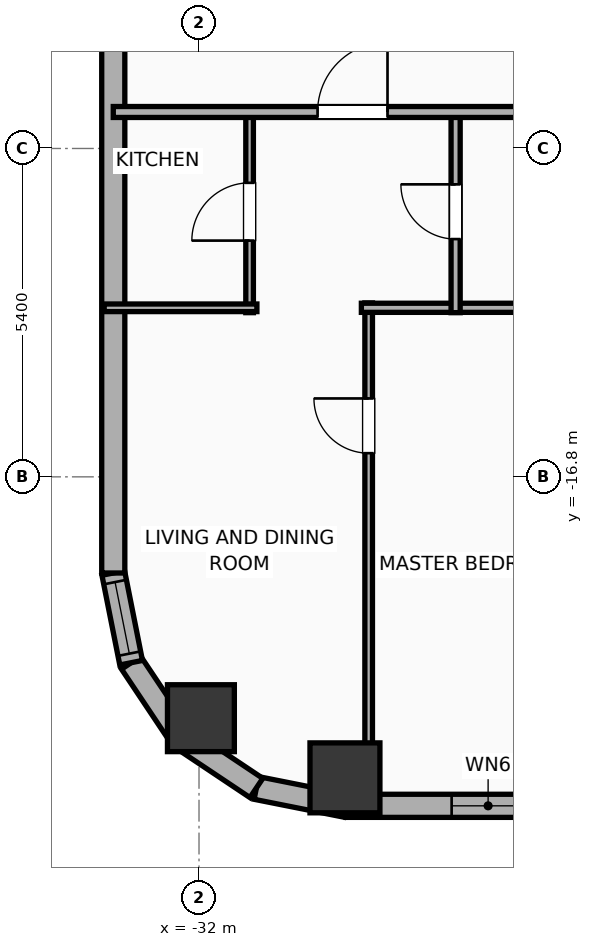
"""IFC4 building model, lengths in metres.
Left out: names, types, materials, properties, quantities, classifications, styles, units other than length and angle.
Written with IfcOpenShell. Run it as: python <this file> out.ifc"""

import sys

from ifc_helpers import new_model, si_unit, direction, frame, frame_2d, origin, origin_2d, place, context, subcontext, project, spatial, rectangle, hollow_rectangle, hollow_circle, extrude, element, fill, save


model = new_model("IFC4")
c1 = context("Model", 3, precision=1e-05, world=origin(), true_north=direction((0.0, 1.0)))
c2 = subcontext(c1, "Body", "Model", "MODEL_VIEW")
j1 = project(units=[si_unit("LENGTHUNIT", "METRE"), si_unit("PLANEANGLEUNIT", "RADIAN")], contexts=[c1])
p1 = place(None, origin())
s1 = spatial("IfcSite", under=j1, at=p1, CompositionType="ELEMENT")
p2 = place(p1, origin())
s2 = spatial("IfcBuilding", under=s1, at=p2, CompositionType="ELEMENT")
p3 = place(p2, frame((0.0, 0.0, 29.9)))
s3 = spatial("IfcBuildingStorey", under=s2, at=p3, CompositionType="ELEMENT", Elevation=29.9)
p4 = place(p3, frame((-29.6, -21.75, 0.0), z_axis=(0.0, 0.0, 1.0), x_axis=(1.0, 0.0, 0.0)))
e1 = element("IfcColumn", 1, at=p4, inside=s3, PredefinedType="COLUMN", context=c2, shape_type="SweptSolid", body=[
    extrude(hollow_rectangle(XDim=1.15, YDim=1.15, WallThickness=0.04, at=origin_2d()), origin(), (0.0, 0.0, 1.0), 3.9),
])
p5 = place(p3, frame((-31.969, -20.769, 0.0), z_axis=(0.0, 0.0, 1.0), x_axis=(1.0, 0.0, 0.0)))
e2 = element("IfcColumn", 2, at=p5, inside=s3, PredefinedType="COLUMN", context=c2, shape_type="SweptSolid", body=[
    extrude(hollow_circle(Radius=0.55, WallThickness=0.036, at=origin_2d()), origin(), (0.0, 0.0, 1.0), 3.9),
])
p6 = place(p3, frame((22.381, -22.21, 0.0), z_axis=(0.0, 0.0, 1.0), x_axis=(-1.0, 0.0, 0.0)))
e3 = element("IfcWall", 3, at=p6, inside=s3, PredefinedType="ELEMENTEDWALL", context=c2, shape_type="SweptSolid", body=[
    extrude(rectangle(XDim=51.963, YDim=0.38, at=frame_2d((25.981, 0.0))), origin(), (0.0, 0.0, 1.0), 2.54),
])
p7 = place(p6, frame((5.81, 0.0, 0.75)))
e4 = element("IfcOpeningElement", 4, at=p7, cuts=e3, PredefinedType="OPENING", context=c2, shape_type="SweptSolid", body=[
    extrude(rectangle(XDim=2.4, YDim=1.63, at=frame_2d((1.2, 0.815))), frame((0.0, 0.2, 0.0), z_axis=(0.0, -1.0, 0.0), x_axis=(1.0, 0.0, 0.0)), (0.0, 0.0, 1.0), 0.4),
])
p8 = place(p6, frame((26.431, 0.0, 0.75)))
e5 = element("IfcOpeningElement", 5, at=p8, cuts=e3, PredefinedType="OPENING", context=c2, shape_type="SweptSolid", body=[
    extrude(rectangle(XDim=2.4, YDim=1.63, at=frame_2d((1.2, 0.815))), frame((0.0, 0.2, 0.0), z_axis=(0.0, -1.0, 0.0), x_axis=(1.0, 0.0, 0.0)), (0.0, 0.0, 1.0), 0.4),
])
p9 = place(p6, frame((42.952, 0.0, 0.75)))
e6 = element("IfcOpeningElement", 6, at=p9, cuts=e3, PredefinedType="OPENING", context=c2, shape_type="SweptSolid", body=[
    extrude(rectangle(XDim=2.4, YDim=1.63, at=frame_2d((1.2, 0.815))), frame((0.0, 0.2, 0.0), z_axis=(0.0, -1.0, 0.0), x_axis=(1.0, 0.0, 0.0)), (0.0, 0.0, 1.0), 0.4),
])
p10 = place(p6, frame((49.027, 0.0, 0.75)))
e7 = element("IfcOpeningElement", 7, at=p10, cuts=e3, PredefinedType="OPENING", context=c2, shape_type="SweptSolid", body=[
    extrude(rectangle(XDim=1.2, YDim=1.63, at=frame_2d((0.6, 0.815))), frame((0.0, 0.2, 0.0), z_axis=(0.0, -1.0, 0.0), x_axis=(1.0, 0.0, 0.0)), (0.0, 0.0, 1.0), 0.4),
])
p11 = place(p6, frame((46.476, 0.0, 0.75)))
e8 = element("IfcOpeningElement", 8, at=p11, cuts=e3, PredefinedType="OPENING", context=c2, shape_type="SweptSolid", body=[
    extrude(rectangle(XDim=1.2, YDim=1.63, at=frame_2d((0.6, 0.815))), frame((0.0, 0.2, 0.0), z_axis=(0.0, -1.0, 0.0), x_axis=(1.0, 0.0, 0.0)), (0.0, 0.0, 1.0), 0.4),
])
p12 = place(p6, frame((39.181, 0.0, 0.75)))
e9 = element("IfcOpeningElement", 9, at=p12, cuts=e3, PredefinedType="OPENING", context=c2, shape_type="SweptSolid", body=[
    extrude(rectangle(XDim=1.2, YDim=1.63, at=frame_2d((0.6, 0.815))), frame((0.0, 0.2, 0.0), z_axis=(0.0, -1.0, 0.0), x_axis=(1.0, 0.0, 0.0)), (0.0, 0.0, 1.0), 0.4),
])
p13 = place(p6, frame((32.476, 0.0, 0.75)))
e10 = element("IfcOpeningElement", 10, at=p13, cuts=e3, PredefinedType="OPENING", context=c2, shape_type="SweptSolid", body=[
    extrude(rectangle(XDim=1.2, YDim=1.63, at=frame_2d((0.6, 0.815))), frame((0.0, 0.2, 0.0), z_axis=(0.0, -1.0, 0.0), x_axis=(1.0, 0.0, 0.0)), (0.0, 0.0, 1.0), 0.4),
])
p14 = place(p6, frame((35.276, 0.0, 0.75)))
e11 = element("IfcOpeningElement", 11, at=p14, cuts=e3, PredefinedType="OPENING", context=c2, shape_type="SweptSolid", body=[
    extrude(rectangle(XDim=1.2, YDim=1.63, at=frame_2d((0.6, 0.815))), frame((0.0, 0.2, 0.0), z_axis=(0.0, -1.0, 0.0), x_axis=(1.0, 0.0, 0.0)), (0.0, 0.0, 1.0), 0.4),
])
p15 = place(p6, frame((29.491, 0.0, 0.75)))
e12 = element("IfcOpeningElement", 12, at=p15, cuts=e3, PredefinedType="OPENING", context=c2, shape_type="SweptSolid", body=[
    extrude(rectangle(XDim=0.85, YDim=1.63, at=frame_2d((0.425, 0.815))), frame((0.0, 0.2, 0.0), z_axis=(0.0, -1.0, 0.0), x_axis=(1.0, 0.0, 0.0)), (0.0, 0.0, 1.0), 0.4),
])
p16 = place(p6, frame((21.596, 0.0, 0.75)))
e13 = element("IfcOpeningElement", 13, at=p16, cuts=e3, PredefinedType="OPENING", context=c2, shape_type="SweptSolid", body=[
    extrude(rectangle(XDim=1.2, YDim=1.63, at=frame_2d((0.6, 0.815))), frame((0.0, 0.2, 0.0), z_axis=(0.0, -1.0, 0.0), x_axis=(1.0, 0.0, 0.0)), (0.0, 0.0, 1.0), 0.4),
])
p17 = place(p6, frame((24.036, 0.0, 0.75)))
e14 = element("IfcOpeningElement", 14, at=p17, cuts=e3, PredefinedType="OPENING", context=c2, shape_type="SweptSolid", body=[
    extrude(rectangle(XDim=1.2, YDim=1.63, at=frame_2d((0.6, 0.815))), frame((0.0, 0.2, 0.0), z_axis=(0.0, -1.0, 0.0), x_axis=(1.0, 0.0, 0.0)), (0.0, 0.0, 1.0), 0.4),
])
p18 = place(p6, frame((17.886, 0.0, 0.75)))
e15 = element("IfcOpeningElement", 15, at=p18, cuts=e3, PredefinedType="OPENING", context=c2, shape_type="SweptSolid", body=[
    extrude(rectangle(XDim=1.2, YDim=1.63, at=frame_2d((0.6, 0.815))), frame((0.0, 0.2, 0.0), z_axis=(0.0, -1.0, 0.0), x_axis=(1.0, 0.0, 0.0)), (0.0, 0.0, 1.0), 0.4),
])
p19 = place(p6, frame((15.086, 0.0, 0.75)))
e16 = element("IfcOpeningElement", 16, at=p19, cuts=e3, PredefinedType="OPENING", context=c2, shape_type="SweptSolid", body=[
    extrude(rectangle(XDim=1.2, YDim=1.63, at=frame_2d((0.6, 0.815))), frame((0.0, 0.2, 0.0), z_axis=(0.0, -1.0, 0.0), x_axis=(1.0, 0.0, 0.0)), (0.0, 0.0, 1.0), 0.4),
])
p20 = place(p6, frame((11.181, 0.0, 0.75)))
e17 = element("IfcOpeningElement", 17, at=p20, cuts=e3, PredefinedType="OPENING", context=c2, shape_type="SweptSolid", body=[
    extrude(rectangle(XDim=1.2, YDim=1.63, at=frame_2d((0.6, 0.815))), frame((0.0, 0.2, 0.0), z_axis=(0.0, -1.0, 0.0), x_axis=(1.0, 0.0, 0.0)), (0.0, 0.0, 1.0), 0.4),
])
p21 = place(p6, frame((3.886, 0.0, 0.75)))
e18 = element("IfcOpeningElement", 18, at=p21, cuts=e3, PredefinedType="OPENING", context=c2, shape_type="SweptSolid", body=[
    extrude(rectangle(XDim=1.2, YDim=1.63, at=frame_2d((0.6, 0.815))), frame((0.0, 0.2, 0.0), z_axis=(0.0, -1.0, 0.0), x_axis=(1.0, 0.0, 0.0)), (0.0, 0.0, 1.0), 0.4),
])
p22 = place(p6, frame((1.536, 0.0, 0.75)))
e19 = element("IfcOpeningElement", 19, at=p22, cuts=e3, PredefinedType="OPENING", context=c2, shape_type="SweptSolid", body=[
    extrude(rectangle(XDim=1.2, YDim=1.63, at=frame_2d((0.6, 0.815))), frame((0.0, 0.2, 0.0), z_axis=(0.0, -1.0, 0.0), x_axis=(1.0, 0.0, 0.0)), (0.0, 0.0, 1.0), 0.4),
])
p23 = place(p3, frame((-29.581, -22.21, 0.0), z_axis=(0.0, 0.0, 1.0), x_axis=(-0.980786132421, 0.195086038585, 0.0)))
e20 = element("IfcWall", 20, at=p23, inside=s3, PredefinedType="ELEMENTEDWALL", context=c2, shape_type="SweptSolid", body=[
    extrude(rectangle(XDim=1.504, YDim=0.38, at=frame_2d((0.752, 0.0))), origin(), (0.0, 0.0, 1.0), 2.54),
])
p24 = place(p3, frame((-31.057, -21.917, 0.0), z_axis=(0.0, 0.0, 1.0), x_axis=(-0.831442848281, 0.555610286119, 0.0)))
e21 = element("IfcWall", 21, at=p24, inside=s3, PredefinedType="ELEMENTEDWALL", context=c2, shape_type="SweptSolid", body=[
    extrude(rectangle(XDim=1.485, YDim=0.38, at=frame_2d((0.743, 0.0))), origin(), (0.0, 0.0, 1.0), 2.54),
])
p25 = place(p3, frame((-32.292, -21.091, 0.0), z_axis=(0.0, 0.0, 1.0), x_axis=(-0.555572577804, 0.831468045563, 0.0)))
e22 = element("IfcWall", 22, at=p25, inside=s3, PredefinedType="ELEMENTEDWALL", context=c2, shape_type="SweptSolid", body=[
    extrude(rectangle(XDim=1.485, YDim=0.38, at=frame_2d((0.742, 0.0))), origin(), (0.0, 0.0, 1.0), 3.65),
])
p26 = place(p3, frame((-33.116, -19.857, 0.0), z_axis=(0.0, 0.0, 1.0), x_axis=(-0.195086038585, 0.980786132421, 0.0)))
e23 = element("IfcWall", 23, at=p26, inside=s3, PredefinedType="ELEMENTEDWALL", context=c2, shape_type="SweptSolid", body=[
    extrude(rectangle(XDim=1.504, YDim=0.38, at=frame_2d((0.752, 0.0))), origin(), (0.0, 0.0, 1.0), 3.65),
])
p27 = place(p26, frame((0.152, 0.0, 0.75)))
e24 = element("IfcOpeningElement", 24, at=p27, cuts=e23, PredefinedType="OPENING", context=c2, shape_type="SweptSolid", body=[
    extrude(rectangle(XDim=1.2, YDim=2.05, at=frame_2d((0.6, 1.025))), frame((0.0, 0.2, 0.0), z_axis=(0.0, -1.0, 0.0), x_axis=(1.0, 0.0, 0.0)), (0.0, 0.0, 1.0), 0.4),
])
p28 = place(p3, frame((-33.41, -18.381, 0.0), z_axis=(0.0, 0.0, 1.0), x_axis=(0.0, 1.0, 0.0)))
e25 = element("IfcWall", 25, at=p28, inside=s3, PredefinedType="ELEMENTEDWALL", context=c2, shape_type="SweptSolid", body=[
    extrude(rectangle(XDim=36.763, YDim=0.38, at=frame_2d((18.381, 0.0))), origin(), (0.0, 0.0, 1.0), 2.54),
])
p29 = place(p28, frame((33.537, 0.0, 0.75)))
e26 = element("IfcOpeningElement", 26, at=p29, cuts=e25, PredefinedType="OPENING", context=c2, shape_type="SweptSolid", body=[
    extrude(rectangle(XDim=1.2, YDim=1.63, at=frame_2d((0.6, 0.815))), frame((0.0, 0.2, 0.0), z_axis=(0.0, -1.0, 0.0), x_axis=(1.0, 0.0, 0.0)), (0.0, 0.0, 1.0), 0.4),
])
p30 = place(p28, frame((22.476, 0.0, 0.75)))
e27 = element("IfcOpeningElement", 27, at=p30, cuts=e25, PredefinedType="OPENING", context=c2, shape_type="SweptSolid", body=[
    extrude(rectangle(XDim=1.2, YDim=1.63, at=frame_2d((0.6, 0.815))), frame((0.0, 0.2, 0.0), z_axis=(0.0, -1.0, 0.0), x_axis=(1.0, 0.0, 0.0)), (0.0, 0.0, 1.0), 0.4),
])
p31 = place(p28, frame((13.226, 0.0, 0.75)))
e28 = element("IfcOpeningElement", 28, at=p31, cuts=e25, PredefinedType="OPENING", context=c2, shape_type="SweptSolid", body=[
    extrude(rectangle(XDim=1.2, YDim=1.63, at=frame_2d((0.6, 0.815))), frame((0.0, 0.2, 0.0), z_axis=(0.0, -1.0, 0.0), x_axis=(1.0, 0.0, 0.0)), (0.0, 0.0, 1.0), 0.4),
])
p32 = place(p3, frame((-29.21, -22.36, 0.0), z_axis=(0.0, 0.0, 1.0), x_axis=(0.0, 1.0, 0.0)))
e29 = element("IfcWall", 29, at=p32, inside=s3, PredefinedType="PARTITIONING", context=c2, shape_type="SweptSolid", body=[
    extrude(rectangle(XDim=8.42, YDim=0.125, at=frame_2d((4.21, 0.0))), origin(), (0.0, 0.0, 1.0), 3.65),
])
p33 = place(p32, frame((5.949, 0.0, 0.0)))
e30 = element("IfcOpeningElement", 30, at=p33, cuts=e29, PredefinedType="OPENING", context=c2, shape_type="SweptSolid", body=[
    extrude(rectangle(XDim=0.9, YDim=2.05, at=frame_2d((0.45, 1.025))), frame((0.0, 0.073, 0.0), z_axis=(0.0, -1.0, 0.0), x_axis=(1.0, 0.0, 0.0)), (0.0, 0.0, 1.0), 0.145),
])
p34 = place(p3, frame((-29.33, -14.02, 0.0), z_axis=(0.0, 0.0, 1.0), x_axis=(1.0, 0.0, 0.0)))
e31 = element("IfcWall", 31, at=p34, inside=s3, PredefinedType="PLUMBINGWALL", context=c2, shape_type="SweptSolid", body=[
    extrude(rectangle(XDim=3.79, YDim=0.15, at=frame_2d((1.895, 0.0))), origin(), (0.0, 0.0, 1.0), 3.65),
])
p35 = place(p3, frame((-31.168, -14.1, 0.0), z_axis=(0.0, 0.0, 1.0), x_axis=(0.0, 1.0, 0.0)))
e32 = element("IfcWall", 32, at=p35, inside=s3, PredefinedType="PARTITIONING", context=c2, shape_type="SweptSolid", body=[
    extrude(rectangle(XDim=3.32, YDim=0.125, at=frame_2d((1.66, 0.0))), origin(), (0.0, 0.0, 1.0), 3.65),
])
p36 = place(p35, frame((1.185, 0.0, 0.0)))
e33 = element("IfcOpeningElement", 33, at=p36, cuts=e32, PredefinedType="OPENING", context=c2, shape_type="SweptSolid", body=[
    extrude(rectangle(XDim=0.95, YDim=2.05, at=frame_2d((0.475, 1.025))), frame((0.0, 0.073, 0.0), z_axis=(0.0, -1.0, 0.0), x_axis=(1.0, 0.0, 0.0)), (0.0, 0.0, 1.0), 0.145),
])
p37 = place(p3, frame((-33.56, -14.02, 0.0), z_axis=(0.0, 0.0, 1.0), x_axis=(1.0, 0.0, 0.0)))
e34 = element("IfcWall", 34, at=p37, inside=s3, PredefinedType="PARTITIONING", context=c2, shape_type="SweptSolid", body=[
    extrude(rectangle(XDim=2.512, YDim=0.125, at=frame_2d((1.256, 0.0))), origin(), (0.0, 0.0, 1.0), 3.65),
])
p38 = place(p3, frame((-27.78, -14.1, 0.0), z_axis=(0.0, 0.0, 1.0), x_axis=(0.0, 1.0, 0.0)))
e35 = element("IfcWall", 35, at=p38, inside=s3, PredefinedType="PLUMBINGWALL", context=c2, shape_type="SweptSolid", body=[
    extrude(rectangle(XDim=3.32, YDim=0.15, at=frame_2d((1.66, 0.0))), origin(), (0.0, 0.0, 1.0), 3.65),
])
p39 = place(p38, frame((1.21, 0.0, 0.0)))
e36 = element("IfcOpeningElement", 36, at=p39, cuts=e35, PredefinedType="OPENING", context=c2, shape_type="SweptSolid", body=[
    extrude(rectangle(XDim=0.9, YDim=2.05, at=frame_2d((0.45, 1.025))), frame((0.0, 0.085, 0.0), z_axis=(0.0, -1.0, 0.0), x_axis=(1.0, 0.0, 0.0)), (0.0, 0.0, 1.0), 0.17),
])
p40 = place(p3, frame((-33.41, -10.8, 0.0), z_axis=(0.0, 0.0, 1.0), x_axis=(1.0, 0.0, 0.0)))
e37 = element("IfcWall", 37, at=p40, inside=s3, PredefinedType="PARTITIONING", context=c2, shape_type="SweptSolid", body=[
    extrude(rectangle(XDim=59.62, YDim=0.18, at=frame_2d((29.81, 0.0))), origin(), (0.0, 0.0, 1.0), 3.65),
])
p41 = place(p40, frame((3.36, 0.0, 0.0)))
e38 = element("IfcOpeningElement", 38, at=p41, cuts=e37, PredefinedType="OPENING", context=c2, shape_type="SweptSolid", body=[
    extrude(rectangle(XDim=1.15, YDim=2.05, at=frame_2d((0.575, 1.025))), frame((0.0, 0.1, 0.0), z_axis=(0.0, -1.0, 0.0), x_axis=(1.0, 0.0, 0.0)), (0.0, 0.0, 1.0), 0.2),
])
p42 = place(p40, frame((10.908, 0.0, 0.0)))
e39 = element("IfcOpeningElement", 39, at=p42, cuts=e37, PredefinedType="OPENING", context=c2, shape_type="SweptSolid", body=[
    extrude(rectangle(XDim=1.15, YDim=2.05, at=frame_2d((0.575, 1.025))), frame((0.0, 0.1, 0.0), z_axis=(0.0, -1.0, 0.0), x_axis=(1.0, 0.0, 0.0)), (0.0, 0.0, 1.0), 0.2),
])
p43 = place(p40, frame((15.755, 0.0, 0.0)))
e40 = element("IfcOpeningElement", 40, at=p43, cuts=e37, PredefinedType="OPENING", context=c2, shape_type="SweptSolid", body=[
    extrude(rectangle(XDim=0.9, YDim=2.05, at=frame_2d((0.45, 1.025))), frame((0.0, 0.1, 0.0), z_axis=(0.0, -1.0, 0.0), x_axis=(1.0, 0.0, 0.0)), (0.0, 0.0, 1.0), 0.2),
])
p44 = place(p40, frame((22.11, 0.0, 0.0)))
e41 = element("IfcOpeningElement", 41, at=p44, cuts=e37, PredefinedType="OPENING", context=c2, shape_type="SweptSolid", body=[
    extrude(rectangle(XDim=1.15, YDim=2.05, at=frame_2d((0.575, 1.025))), frame((0.0, 0.1, 0.0), z_axis=(0.0, -1.0, 0.0), x_axis=(1.0, 0.0, 0.0)), (0.0, 0.0, 1.0), 0.2),
])
p45 = place(p40, frame((27.709, 0.0, 0.0)))
e42 = element("IfcOpeningElement", 42, at=p45, cuts=e37, PredefinedType="OPENING", context=c2, shape_type="SweptSolid", body=[
    extrude(rectangle(XDim=1.15, YDim=2.05, at=frame_2d((0.575, 1.025))), frame((0.0, 0.1, 0.0), z_axis=(0.0, -1.0, 0.0), x_axis=(1.0, 0.0, 0.0)), (0.0, 0.0, 1.0), 0.2),
])
p46 = place(p40, frame((33.349, 0.0, 0.0)))
e43 = element("IfcOpeningElement", 43, at=p46, cuts=e37, PredefinedType="OPENING", context=c2, shape_type="SweptSolid", body=[
    extrude(rectangle(XDim=1.15, YDim=2.05, at=frame_2d((0.575, 1.025))), frame((0.0, 0.1, 0.0), z_axis=(0.0, -1.0, 0.0), x_axis=(1.0, 0.0, 0.0)), (0.0, 0.0, 1.0), 0.2),
])
p47 = place(p40, frame((36.759, 0.0, 0.0)))
e44 = element("IfcOpeningElement", 44, at=p47, cuts=e37, PredefinedType="OPENING", context=c2, shape_type="SweptSolid", body=[
    extrude(rectangle(XDim=1.15, YDim=2.05, at=frame_2d((0.575, 1.025))), frame((0.0, 0.1, 0.0), z_axis=(0.0, -1.0, 0.0), x_axis=(1.0, 0.0, 0.0)), (0.0, 0.0, 1.0), 0.2),
])
p48 = place(p40, frame((43.752, 0.0, 0.0)))
e45 = element("IfcOpeningElement", 45, at=p48, cuts=e37, PredefinedType="OPENING", context=c2, shape_type="SweptSolid", body=[
    extrude(rectangle(XDim=0.9, YDim=2.05, at=frame_2d((0.45, 1.025))), frame((0.0, 0.1, 0.0), z_axis=(0.0, -1.0, 0.0), x_axis=(1.0, 0.0, 0.0)), (0.0, 0.0, 1.0), 0.2),
])
p49 = place(p40, frame((47.962, 0.0, 0.0)))
e46 = element("IfcOpeningElement", 46, at=p49, cuts=e37, PredefinedType="OPENING", context=c2, shape_type="SweptSolid", body=[
    extrude(rectangle(XDim=1.15, YDim=2.05, at=frame_2d((0.575, 1.025))), frame((0.0, 0.1, 0.0), z_axis=(0.0, -1.0, 0.0), x_axis=(1.0, 0.0, 0.0)), (0.0, 0.0, 1.0), 0.2),
])
p50 = place(p40, frame((55.641, 0.0, 0.0)))
e47 = element("IfcOpeningElement", 47, at=p50, cuts=e37, PredefinedType="OPENING", context=c2, shape_type="SweptSolid", body=[
    extrude(rectangle(XDim=1.15, YDim=2.05, at=frame_2d((0.575, 1.025))), frame((0.0, 0.1, 0.0), z_axis=(0.0, -1.0, 0.0), x_axis=(1.0, 0.0, 0.0)), (0.0, 0.0, 1.0), 0.2),
])
p51 = place(p27, origin())
e48 = element("IfcWindow", 48, at=p51, inside=s3, PartitioningType="SINGLE_PANEL", PredefinedType="WINDOW", context=c2, shape_type="SweptSolid", body=[
    extrude(rectangle(XDim=1.2, YDim=2.05, at=frame_2d((0.6, 1.025))), frame((0.0, 0.03, 0.0), z_axis=(0.0, -1.0, 0.0), x_axis=(1.0, 0.0, 0.0)), (0.0, 0.0, 1.0), 0.06),
])
fill(e24, e48)
p52 = place(p10, origin())
e49 = element("IfcWindow", 49, at=p52, inside=s3, PartitioningType="SINGLE_PANEL", PredefinedType="WINDOW", context=c2, shape_type="SweptSolid", body=[
    extrude(rectangle(XDim=1.2, YDim=1.63, at=frame_2d((0.6, 0.815))), frame((0.0, 0.03, 0.0), z_axis=(0.0, -1.0, 0.0), x_axis=(1.0, 0.0, 0.0)), (0.0, 0.0, 1.0), 0.06),
])
fill(e7, e49)
p53 = place(p33, origin())
e50 = element("IfcDoor", 50, at=p53, inside=s3, OperationType="SINGLE_SWING_RIGHT", PredefinedType="DOOR", context=c2, shape_type="SweptSolid", body=[
    extrude(rectangle(XDim=0.9, YDim=2.05, at=frame_2d((0.45, 1.025))), frame((0.0, 0.025, 0.0), z_axis=(0.0, -1.0, 0.0), x_axis=(1.0, 0.0, 0.0)), (0.0, 0.0, 1.0), 0.05),
])
fill(e30, e50)
p54 = place(p36, origin())
e51 = element("IfcDoor", 51, at=p54, inside=s3, OperationType="SINGLE_SWING_LEFT", PredefinedType="DOOR", context=c2, shape_type="SweptSolid", body=[
    extrude(rectangle(XDim=0.95, YDim=2.05, at=frame_2d((0.475, 1.025))), frame((0.0, 0.025, 0.0), z_axis=(0.0, -1.0, 0.0), x_axis=(1.0, 0.0, 0.0)), (0.0, 0.0, 1.0), 0.05),
])
fill(e33, e51)
p55 = place(p39, origin())
e52 = element("IfcDoor", 52, at=p55, inside=s3, OperationType="SINGLE_SWING_RIGHT", PredefinedType="DOOR", context=c2, shape_type="SweptSolid", body=[
    extrude(rectangle(XDim=0.9, YDim=2.05, at=frame_2d((0.45, 1.025))), frame((0.0, 0.025, 0.0), z_axis=(0.0, -1.0, 0.0), x_axis=(1.0, 0.0, 0.0)), (0.0, 0.0, 1.0), 0.05),
])
fill(e36, e52)
p56 = place(p41, origin())
e53 = element("IfcDoor", 53, at=p56, inside=s3, OperationType="SINGLE_SWING_RIGHT", PredefinedType="DOOR", context=c2, shape_type="SweptSolid", body=[
    extrude(rectangle(XDim=1.15, YDim=2.05, at=frame_2d((0.575, 1.025))), frame((0.0, 0.025, 0.0), z_axis=(0.0, -1.0, 0.0), x_axis=(1.0, 0.0, 0.0)), (0.0, 0.0, 1.0), 0.05),
])
fill(e38, e53)
save(model, sys.argv[1])
